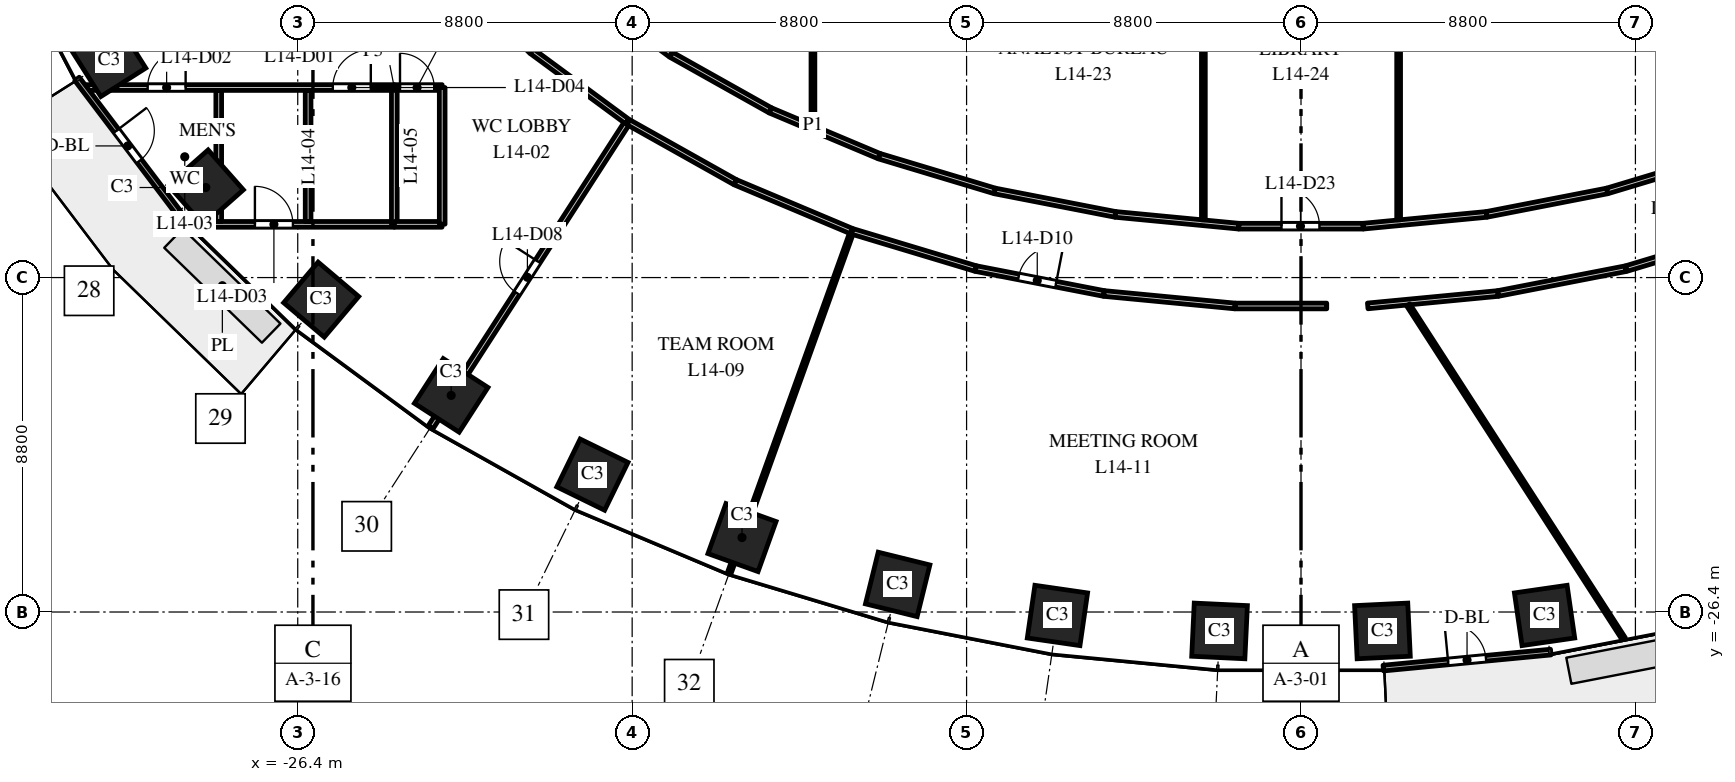
"""IFC4 building model, lengths in metres.
Left out: names, types, materials, properties, quantities, classifications, styles, units other than length and angle.
Written with IfcOpenShell. Run it as: python <this file> out.ifc"""

import sys

from ifc_helpers import new_model, si_unit, direction, frame, frame_2d, origin, origin_2d, place, context, subcontext, project, spatial, rectangle, extrude, element, fill, save


model = new_model("IFC4")
c1 = context("Model", 3, precision=1e-05, world=origin(), true_north=direction((0.0, 1.0)))
c2 = subcontext(c1, "Body", "Model", "MODEL_VIEW")
j1 = project(units=[si_unit("LENGTHUNIT", "METRE"), si_unit("PLANEANGLEUNIT", "RADIAN")], contexts=[c1])
p1 = place(None, origin())
s1 = spatial("IfcSite", under=j1, at=p1, CompositionType="ELEMENT")
p2 = place(p1, origin())
s2 = spatial("IfcBuilding", under=s1, at=p2, CompositionType="ELEMENT")
p3 = place(p2, frame((0.0, 0.0, 66.5)))
s3 = spatial("IfcBuildingStorey", under=s2, at=p3, CompositionType="ELEMENT", Elevation=66.5)
for number, where, z_axis, x_axis in (
    (1, (-31.365, -11.871, 0.0), (0.0, 0.0, 1.0), (0.535, -0.845, 0.0)),
    (2, (-28.819, -15.23, 0.0), (0.0, 0.0, 1.0), (0.663, -0.749, 0.0)),
    (3, (-25.783, -18.18, 0.0), (0.0, 0.0, 1.0), (0.763, -0.646, 0.0)),
    (4, (-22.362, -20.7, 0.0), (0.0, 0.0, 1.0), (0.84, -0.542, 0.0)),
    (5, (-18.646, -22.785, 0.0), (0.0, 0.0, 1.0), (0.898, -0.439, 0.0)),
    (6, (-14.709, -24.441, 0.0), (0.0, 0.0, 1.0), (0.941, -0.338, 0.0)),
    (7, (-10.613, -25.674, 0.0), (0.0, 0.0, 1.0), (0.971, -0.24, 0.0)),
    (8, (-6.409, -26.491, 0.0), (0.0, 0.0, 1.0), (0.99, -0.143, 0.0)),
    (9, (-2.143, -26.898, 0.0), (0.0, 0.0, 1.0), (0.999, -0.048, 0.0)),
    (10, (2.143, -26.898, 0.0), (0.0, 0.0, 1.0), (0.999, 0.048, 0.0)),
    (11, (6.409, -26.491, 0.0), (0.0, 0.0, 1.0), (0.99, 0.143, 0.0)),
):
    element("IfcColumn", number, at=place(p3, frame(where, z_axis=z_axis, x_axis=x_axis)), inside=s3, PredefinedType="COLUMN", context=c2, shape_type="SweptSolid", body=[
        extrude(rectangle(XDim=1.4, YDim=1.4, at=origin_2d()), origin(), (0.0, 0.0, 1.0), 4.0),
    ])
p4 = place(p3, frame((-32.208, -12.374, 0.0), z_axis=(0.0, 0.0, 1.0), x_axis=(0.604045763106, -0.796949632081, 0.0)))
e12 = element("IfcWall", 12, at=p4, inside=s3, PredefinedType="STANDARD", context=c2, shape_type="SweptSolid", body=[
    extrude(rectangle(XDim=4.423, YDim=0.15, at=frame_2d((2.212, 0.0))), origin(), (0.0, 0.0, 1.0), 3.7),
])
p5 = place(p4, frame((1.712, 0.0, 0.0)))
e13 = element("IfcOpeningElement", 13, at=p5, cuts=e12, PredefinedType="OPENING", context=c2, shape_type="SweptSolid", body=[
    extrude(rectangle(XDim=1.0, YDim=2.4, at=frame_2d((0.5, 1.2))), frame((0.0, 0.085, 0.0), z_axis=(0.0, -1.0, 0.0), x_axis=(1.0, 0.0, 0.0)), (0.0, 0.0, 1.0), 0.17),
])
p6 = place(p3, frame((2.166, -27.875, 0.0), z_axis=(0.0, 0.0, 1.0), x_axis=(0.995473879823, 0.095035543824, 0.0)))
e14 = element("IfcWall", 14, at=p6, inside=s3, PredefinedType="STANDARD", context=c2, shape_type="SweptSolid", body=[
    extrude(rectangle(XDim=4.426, YDim=0.15, at=frame_2d((2.213, 0.0))), origin(), (0.0, 0.0, 1.0), 3.7),
])
p7 = place(p6, frame((1.713, 0.0, 0.0)))
e15 = element("IfcOpeningElement", 15, at=p7, cuts=e14, PredefinedType="OPENING", context=c2, shape_type="SweptSolid", body=[
    extrude(rectangle(XDim=1.0, YDim=2.4, at=frame_2d((0.5, 1.2))), frame((0.0, 0.085, 0.0), z_axis=(0.0, -1.0, 0.0), x_axis=(1.0, 0.0, 0.0)), (0.0, 0.0, 1.0), 0.17),
])
p8 = place(p3, frame((-32.063, -12.6, 0.0), z_axis=(0.0, 0.0, 1.0), x_axis=(1.0, 0.0, 0.0)))
e16 = element("IfcWall", 16, at=p8, inside=s3, PredefinedType="PARTITIONING", context=c2, shape_type="SweptSolid", body=[
    extrude(rectangle(XDim=8.204, YDim=0.15, at=frame_2d((4.102, 0.0))), origin(), (0.0, 0.0, 1.0), 2.85),
])
p9 = place(p8, frame((1.713, 0.0, 0.0)))
e17 = element("IfcOpeningElement", 17, at=p9, cuts=e16, PredefinedType="OPENING", context=c2, shape_type="SweptSolid", body=[
    extrude(rectangle(XDim=1.0, YDim=2.1, at=frame_2d((0.5, 1.05))), frame((0.0, 0.085, 0.0), z_axis=(0.0, -1.0, 0.0), x_axis=(1.0, 0.0, 0.0)), (0.0, 0.0, 1.0), 0.17),
])
p10 = place(p8, frame((6.586, 0.0, 0.0)))
e18 = element("IfcOpeningElement", 18, at=p10, cuts=e16, PredefinedType="OPENING", context=c2, shape_type="SweptSolid", body=[
    extrude(rectangle(XDim=1.0, YDim=2.1, at=frame_2d((0.5, 1.05))), frame((0.0, 0.085, 0.0), z_axis=(0.0, -1.0, 0.0), x_axis=(1.0, 0.0, 0.0)), (0.0, 0.0, 1.0), 0.17),
])
p11 = place(p3, frame((-29.252, -16.2, 0.0), z_axis=(0.0, 0.0, 1.0), x_axis=(1.0, 0.0, 0.0)))
e19 = element("IfcWall", 19, at=p11, inside=s3, PredefinedType="PARTITIONING", context=c2, shape_type="SweptSolid", body=[
    extrude(rectangle(XDim=5.393, YDim=0.15, at=frame_2d((2.697, 0.0))), origin(), (0.0, 0.0, 1.0), 2.85),
])
p12 = place(p11, frame((1.725, 0.0, 0.0)))
e20 = element("IfcOpeningElement", 20, at=p12, cuts=e19, PredefinedType="OPENING", context=c2, shape_type="SweptSolid", body=[
    extrude(rectangle(XDim=1.0, YDim=2.1, at=frame_2d((0.5, 1.05))), frame((0.0, 0.085, 0.0), z_axis=(0.0, -1.0, 0.0), x_axis=(1.0, 0.0, 0.0)), (0.0, 0.0, 1.0), 0.17),
])
p13 = place(p3, frame((-28.479, -16.125, 0.0), z_axis=(0.0, 0.0, 1.0), x_axis=(0.0, 1.0, 0.0)))
e21 = element("IfcWall", 21, at=p13, inside=s3, PredefinedType="PARTITIONING", context=c2, shape_type="SweptSolid", body=[
    extrude(rectangle(XDim=3.45, YDim=0.15, at=frame_2d((1.725, 0.0))), origin(), (0.0, 0.0, 1.0), 2.85),
])
p14 = place(p3, frame((-26.127, -16.125, 0.0), z_axis=(0.0, 0.0, 1.0), x_axis=(0.0, 1.0, 0.0)))
e22 = element("IfcWall", 22, at=p14, inside=s3, PredefinedType="PARTITIONING", context=c2, shape_type="SweptSolid", body=[
    extrude(rectangle(XDim=3.45, YDim=0.15, at=frame_2d((1.725, 0.0))), origin(), (0.0, 0.0, 1.0), 3.7),
])
p15 = place(p3, frame((-23.859, -16.2, 0.0), z_axis=(0.0, 0.0, 1.0), x_axis=(0.0, 1.0, 0.0)))
e23 = element("IfcWall", 23, at=p15, inside=s3, PredefinedType="PARTITIONING", context=c2, shape_type="SweptSolid", body=[
    extrude(rectangle(XDim=3.6, YDim=0.15, at=frame_2d((1.8, 0.0))), origin(), (0.0, 0.0, 1.0), 3.7),
])
p16 = place(p3, frame((-23.859, -16.2, 0.0), z_axis=(0.0, 0.0, 1.0), x_axis=(1.0, 0.0, 0.0)))
e24 = element("IfcWall", 24, at=p16, inside=s3, PredefinedType="PARTITIONING", context=c2, shape_type="SweptSolid", body=[
    extrude(rectangle(XDim=1.256, YDim=0.15, at=frame_2d((0.628, 0.0))), origin(), (0.0, 0.0, 1.0), 2.75),
])
p17 = place(p3, frame((-23.859, -12.6, 0.0), z_axis=(0.0, 0.0, 1.0), x_axis=(1.0, 0.0, 0.0)))
e25 = element("IfcWall", 25, at=p17, inside=s3, PredefinedType="PARTITIONING", context=c2, shape_type="SweptSolid", body=[
    extrude(rectangle(XDim=1.26, YDim=0.15, at=frame_2d((0.63, 0.0))), origin(), (0.0, 0.0, 1.0), 3.7),
])
p18 = place(p17, frame((0.15, 0.0, 0.0)))
e26 = element("IfcOpeningElement", 26, at=p18, cuts=e25, PredefinedType="OPENING", context=c2, shape_type="SweptSolid", body=[
    extrude(rectangle(XDim=0.9, YDim=2.1, at=frame_2d((0.45, 1.05))), frame((0.0, 0.085, 0.0), z_axis=(0.0, -1.0, 0.0), x_axis=(1.0, 0.0, 0.0)), (0.0, 0.0, 1.0), 0.17),
])
p19 = place(p3, frame((-22.905, -21.542, 0.0), z_axis=(0.0, 0.0, 1.0), x_axis=(0.542244314938, 0.840220865557, 0.0)))
e27 = element("IfcWall", 27, at=p19, inside=s3, PredefinedType="PARTITIONING", context=c2, shape_type="SweptSolid", body=[
    extrude(rectangle(XDim=9.564, YDim=0.15, at=frame_2d((4.782, 0.0))), origin(), (0.0, 0.0, 1.0), 2.85),
])
p20 = place(p19, frame((4.2, 0.0, 0.0)))
e28 = element("IfcOpeningElement", 28, at=p20, cuts=e27, PredefinedType="OPENING", context=c2, shape_type="SweptSolid", body=[
    extrude(rectangle(XDim=1.0, YDim=2.1, at=frame_2d((0.5, 1.05))), frame((0.0, 0.085, 0.0), z_axis=(0.0, -1.0, 0.0), x_axis=(1.0, 0.0, 0.0)), (0.0, 0.0, 1.0), 0.17),
])
p21 = place(p3, frame((-22.599, -16.196, 0.0), z_axis=(0.0, 0.0, 1.0), x_axis=(0.0, 1.0, 0.0)))
e29 = element("IfcWall", 29, at=p21, inside=s3, PredefinedType="PARTITIONING", context=c2, shape_type="SweptSolid", body=[
    extrude(rectangle(XDim=3.596, YDim=0.15, at=frame_2d((1.798, 0.0))), origin(), (0.0, 0.0, 1.0), 2.75),
])
p22 = place(p3, frame((-21.135, -10.775, 0.0), z_axis=(0.0, 0.0, 1.0), x_axis=(0.717043956417, -0.697027951065, 0.0)))
e30 = element("IfcWall", 30, at=p22, inside=s3, PredefinedType="PARTITIONING", context=c2, shape_type="SweptSolid", body=[
    extrude(rectangle(XDim=1.244, YDim=0.15, at=frame_2d((0.622, 0.0))), origin(), (0.0, 0.0, 1.0), 3.7),
])
p23 = place(p3, frame((-20.243, -11.642, 0.0), z_axis=(0.0, 0.0, 1.0), x_axis=(0.805148342369, -0.593073475027, 0.0)))
e31 = element("IfcWall", 31, at=p23, inside=s3, PredefinedType="PARTITIONING", context=c2, shape_type="SweptSolid", body=[
    extrude(rectangle(XDim=3.117, YDim=0.15, at=frame_2d((1.559, 0.0))), origin(), (0.0, 0.0, 1.0), 2.75),
])
p24 = place(p3, frame((-18.083, -10.625, 0.0), z_axis=(0.0, 0.0, 1.0), x_axis=(0.805150898842, -0.593070004379, 0.0)))
e32 = element("IfcWall", 32, at=p24, inside=s3, PredefinedType="PARTITIONING", context=c2, shape_type="SweptSolid", body=[
    extrude(rectangle(XDim=1.872, YDim=0.15, at=frame_2d((0.936, 0.0))), origin(), (0.0, 0.0, 1.0), 2.75),
])
p25 = place(p3, frame((-17.699, -13.513, 0.0), z_axis=(0.0, 0.0, 1.0), x_axis=(0.872072163686, -0.489377299559, 0.0)))
e33 = element("IfcWall", 33, at=p25, inside=s3, PredefinedType="PARTITIONING", context=c2, shape_type="SweptSolid", body=[
    extrude(rectangle(XDim=3.227, YDim=0.15, at=frame_2d((1.613, 0.0))), origin(), (0.0, 0.0, 1.0), 3.7),
])
p26 = place(p3, frame((-16.576, -11.735, 0.0), z_axis=(0.0, 0.0, 1.0), x_axis=(0.872164226045, -0.489213207924, 0.0)))
e34 = element("IfcWall", 34, at=p26, inside=s3, PredefinedType="PARTITIONING", context=c2, shape_type="SweptSolid", body=[
    extrude(rectangle(XDim=2.998, YDim=0.15, at=frame_2d((1.499, 0.0))), origin(), (0.0, 0.0, 1.0), 2.75),
])
p27 = place(p3, frame((-15.048, -25.383, 0.0), z_axis=(0.0, 0.0, 1.0), x_axis=(0.338338680362, 0.941024408488, 0.0)))
e35 = element("IfcWall", 35, at=p27, inside=s3, PredefinedType="PARTITIONING", context=c2, shape_type="SweptSolid", body=[
    extrude(rectangle(XDim=9.559, YDim=0.1, at=frame_2d((4.779, 0.0))), origin(), (0.0, 0.0, 1.0), 2.85),
])
p28 = place(p3, frame((-14.885, -15.092, 0.0), z_axis=(0.0, 0.0, 1.0), x_axis=(0.921844706698, -0.387559462189, 0.0)))
e36 = element("IfcWall", 36, at=p28, inside=s3, PredefinedType="PARTITIONING", context=c2, shape_type="SweptSolid", body=[
    extrude(rectangle(XDim=3.313, YDim=0.15, at=frame_2d((1.656, 0.0))), origin(), (0.0, 0.0, 1.0), 2.85),
])
p29 = place(p3, frame((-13.961, -13.202, 0.0), z_axis=(0.0, 0.0, 1.0), x_axis=(0.921753827375, -0.387775555857, 0.0)))
e37 = element("IfcWall", 37, at=p29, inside=s3, PredefinedType="PARTITIONING", context=c2, shape_type="SweptSolid", body=[
    extrude(rectangle(XDim=3.103, YDim=0.15, at=frame_2d((1.551, 0.0))), origin(), (0.0, 0.0, 1.0), 2.85),
])
p30 = place(p3, frame((-12.843, -13.587, 0.0), z_axis=(0.0, 0.0, 1.0), x_axis=(0.0, 1.0, 0.0)))
e38 = element("IfcWall", 38, at=p30, inside=s3, PredefinedType="PARTITIONING", context=c2, shape_type="SweptSolid", body=[
    extrude(rectangle(XDim=27.174, YDim=0.1, at=frame_2d((13.587, 0.0))), origin(), (0.0, 0.0, 1.0), 2.75),
])
p31 = place(p3, frame((-11.812, -16.384, 0.0), z_axis=(0.0, 0.0, 1.0), x_axis=(0.95754884035, -0.28827108482, 0.0)))
e39 = element("IfcWall", 39, at=p31, inside=s3, PredefinedType="PARTITIONING", context=c2, shape_type="SweptSolid", body=[
    extrude(rectangle(XDim=3.396, YDim=0.15, at=frame_2d((1.698, 0.0))), origin(), (0.0, 0.0, 1.0), 3.7),
])
p32 = place(p3, frame((-11.101, -14.405, 0.0), z_axis=(0.0, 0.0, 1.0), x_axis=(0.957612601062, -0.28805920622, 0.0)))
e40 = element("IfcWall", 40, at=p32, inside=s3, PredefinedType="PARTITIONING", context=c2, shape_type="SweptSolid", body=[
    extrude(rectangle(XDim=3.18, YDim=0.15, at=frame_2d((1.59, 0.0))), origin(), (0.0, 0.0, 1.0), 3.7),
])
p33 = place(p3, frame((-8.56, -17.363, 0.0), z_axis=(0.0, 0.0, 1.0), x_axis=(0.981639027618, -0.1907480523, 0.0)))
e41 = element("IfcWall", 41, at=p33, inside=s3, PredefinedType="PARTITIONING", context=c2, shape_type="SweptSolid", body=[
    extrude(rectangle(XDim=3.439, YDim=0.15, at=frame_2d((1.72, 0.0))), origin(), (0.0, 0.0, 1.0), 2.85),
])
p34 = place(p33, frame((1.15, 0.0, 0.0)))
e42 = element("IfcOpeningElement", 42, at=p34, cuts=e41, PredefinedType="OPENING", context=c2, shape_type="SweptSolid", body=[
    extrude(rectangle(XDim=1.0, YDim=2.1, at=frame_2d((0.5, 1.05))), frame((0.0, 0.085, 0.0), z_axis=(0.0, -1.0, 0.0), x_axis=(1.0, 0.0, 0.0)), (0.0, 0.0, 1.0), 0.17),
])
p35 = place(p3, frame((-8.056, -15.321, 0.0), z_axis=(0.0, 0.0, 1.0), x_axis=(0.981604377859, -0.190926282547, 0.0)))
e43 = element("IfcWall", 43, at=p35, inside=s3, PredefinedType="PARTITIONING", context=c2, shape_type="SweptSolid", body=[
    extrude(rectangle(XDim=3.231, YDim=0.15, at=frame_2d((1.616, 0.0))), origin(), (0.0, 0.0, 1.0), 2.85),
])
p36 = place(p3, frame((-5.184, -18.019, 0.0), z_axis=(0.0, 0.0, 1.0), x_axis=(0.995482474707, -0.09494547146, 0.0)))
e44 = element("IfcWall", 44, at=p36, inside=s3, PredefinedType="PARTITIONING", context=c2, shape_type="SweptSolid", body=[
    extrude(rectangle(XDim=3.464, YDim=0.15, at=frame_2d((1.732, 0.0))), origin(), (0.0, 0.0, 1.0), 3.7),
])
p37 = place(p3, frame((-4.884, -15.938, 0.0), z_axis=(0.0, 0.0, 1.0), x_axis=(0.99547459835, -0.095028017131, 0.0)))
e45 = element("IfcWall", 45, at=p37, inside=s3, PredefinedType="PARTITIONING", context=c2, shape_type="SweptSolid", body=[
    extrude(rectangle(XDim=3.263, YDim=0.15, at=frame_2d((1.631, 0.0))), origin(), (0.0, 0.0, 1.0), 3.7),
])
p38 = place(p3, frame((-2.569, -16.08, 0.0), z_axis=(0.0, 0.0, 1.0), x_axis=(0.0, 1.0, 0.0)))
e46 = element("IfcWall", 46, at=p38, inside=s3, PredefinedType="PARTITIONING", context=c2, shape_type="SweptSolid", body=[
    extrude(rectangle(XDim=8.919, YDim=0.1, at=frame_2d((4.459, 0.0))), origin(), (0.0, 0.0, 1.0), 2.85),
])
p39 = place(p3, frame((-1.736, -18.348, 0.0), z_axis=(0.0, 0.0, 1.0), x_axis=(1.0, 0.0, 0.0)))
e47 = element("IfcWall", 47, at=p39, inside=s3, PredefinedType="PARTITIONING", context=c2, shape_type="SweptSolid", body=[
    extrude(rectangle(XDim=2.413, YDim=0.15, at=frame_2d((1.207, 0.0))), origin(), (0.0, 0.0, 1.0), 2.85),
])
p40 = place(p3, frame((-1.636, -16.248, 0.0), z_axis=(0.0, 0.0, 1.0), x_axis=(1.0, 0.0, 0.0)))
e48 = element("IfcWall", 48, at=p40, inside=s3, PredefinedType="PARTITIONING", context=c2, shape_type="SweptSolid", body=[
    extrude(rectangle(XDim=3.272, YDim=0.15, at=frame_2d((1.636, 0.0))), origin(), (0.0, 0.0, 1.0), 2.85),
])
p41 = place(p40, frame((1.122, 0.0, 0.0)))
e49 = element("IfcOpeningElement", 49, at=p41, cuts=e48, PredefinedType="OPENING", context=c2, shape_type="SweptSolid", body=[
    extrude(rectangle(XDim=1.0, YDim=2.1, at=frame_2d((0.5, 1.05))), frame((0.0, 0.085, 0.0), z_axis=(0.0, -1.0, 0.0), x_axis=(1.0, 0.0, 0.0)), (0.0, 0.0, 1.0), 0.17),
])
p42 = place(p3, frame((1.636, -16.248, 0.0), z_axis=(0.0, 0.0, 1.0), x_axis=(0.99547459835, 0.095028017131, 0.0)))
e50 = element("IfcWall", 50, at=p42, inside=s3, PredefinedType="PARTITIONING", context=c2, shape_type="SweptSolid", body=[
    extrude(rectangle(XDim=3.263, YDim=0.15, at=frame_2d((1.631, 0.0))), origin(), (0.0, 0.0, 1.0), 2.85),
])
p43 = place(p3, frame((1.756, -18.346, 0.0), z_axis=(0.0, 0.0, 1.0), x_axis=(0.99548367506, 0.094932885187, 0.0)))
e51 = element("IfcWall", 51, at=p43, inside=s3, PredefinedType="PARTITIONING", context=c2, shape_type="SweptSolid", body=[
    extrude(rectangle(XDim=3.444, YDim=0.15, at=frame_2d((1.722, 0.0))), origin(), (0.0, 0.0, 1.0), 2.85),
])
p44 = place(p3, frame((2.569, -16.08, 0.0), z_axis=(0.0, 0.0, 1.0), x_axis=(0.0, 1.0, 0.0)))
e52 = element("IfcWall", 52, at=p44, inside=s3, PredefinedType="PARTITIONING", context=c2, shape_type="SweptSolid", body=[
    extrude(rectangle(XDim=8.919, YDim=0.1, at=frame_2d((4.459, 0.0))), origin(), (0.0, 0.0, 1.0), 2.85),
])
p45 = place(p3, frame((2.822, -18.32, 0.0), z_axis=(0.0, 0.0, 1.0), x_axis=(0.54232046371, -0.840171717354, 0.0)))
e53 = element("IfcWall", 53, at=p45, inside=s3, PredefinedType="PARTITIONING", context=c2, shape_type="SweptSolid", body=[
    extrude(rectangle(XDim=10.455, YDim=0.1, at=frame_2d((5.228, 0.0))), origin(), (0.0, 0.0, 1.0), 2.85),
])
p46 = place(p3, frame((4.884, -15.938, 0.0), z_axis=(0.0, 0.0, 1.0), x_axis=(0.981604377859, 0.190926282547, 0.0)))
e54 = element("IfcWall", 54, at=p46, inside=s3, PredefinedType="PARTITIONING", context=c2, shape_type="SweptSolid", body=[
    extrude(rectangle(XDim=3.231, YDim=0.15, at=frame_2d((1.616, 0.0))), origin(), (0.0, 0.0, 1.0), 3.7),
])
p47 = place(p3, frame((5.184, -18.019, 0.0), z_axis=(0.0, 0.0, 1.0), x_axis=(0.981650299947, 0.190690032812, 0.0)))
e55 = element("IfcWall", 55, at=p47, inside=s3, PredefinedType="PARTITIONING", context=c2, shape_type="SweptSolid", body=[
    extrude(rectangle(XDim=3.42, YDim=0.15, at=frame_2d((1.71, 0.0))), origin(), (0.0, 0.0, 1.0), 3.7),
])
p48 = place(p3, frame((8.056, -15.321, 0.0), z_axis=(0.0, 0.0, 1.0), x_axis=(0.957612601062, 0.28805920622, 0.0)))
e56 = element("IfcWall", 56, at=p48, inside=s3, PredefinedType="PARTITIONING", context=c2, shape_type="SweptSolid", body=[
    extrude(rectangle(XDim=3.18, YDim=0.15, at=frame_2d((1.59, 0.0))), origin(), (0.0, 0.0, 1.0), 2.85),
])
p49 = place(p3, frame((8.56, -17.363, 0.0), z_axis=(0.0, 0.0, 1.0), x_axis=(0.95754884035, 0.28827108482, 0.0)))
e57 = element("IfcWall", 57, at=p49, inside=s3, PredefinedType="PARTITIONING", context=c2, shape_type="SweptSolid", body=[
    extrude(rectangle(XDim=3.396, YDim=0.15, at=frame_2d((1.698, 0.0))), origin(), (0.0, 0.0, 1.0), 2.85),
])
p50 = place(p49, frame((1.15, 0.0, 0.0)))
e58 = element("IfcOpeningElement", 58, at=p50, cuts=e57, PredefinedType="OPENING", context=c2, shape_type="SweptSolid", body=[
    extrude(rectangle(XDim=1.0, YDim=2.1, at=frame_2d((0.5, 1.05))), frame((0.0, 0.085, 0.0), z_axis=(0.0, -1.0, 0.0), x_axis=(1.0, 0.0, 0.0)), (0.0, 0.0, 1.0), 0.17),
])
p51 = place(p5, origin())
e59 = element("IfcDoor", 59, at=p51, inside=s3, OperationType="SINGLE_SWING_LEFT", PredefinedType="DOOR", context=c2, shape_type="SweptSolid", body=[
    extrude(rectangle(XDim=1.0, YDim=2.4, at=frame_2d((0.5, 1.2))), frame((0.0, 0.025, 0.0), z_axis=(0.0, -1.0, 0.0), x_axis=(1.0, 0.0, 0.0)), (0.0, 0.0, 1.0), 0.05),
])
fill(e13, e59)
p52 = place(p7, origin())
e60 = element("IfcDoor", 60, at=p52, inside=s3, OperationType="SINGLE_SWING_LEFT", PredefinedType="DOOR", context=c2, shape_type="SweptSolid", body=[
    extrude(rectangle(XDim=1.0, YDim=2.4, at=frame_2d((0.5, 1.2))), frame((0.0, 0.025, 0.0), z_axis=(0.0, -1.0, 0.0), x_axis=(1.0, 0.0, 0.0)), (0.0, 0.0, 1.0), 0.05),
])
fill(e15, e60)
p53 = place(p9, origin())
e61 = element("IfcDoor", 61, at=p53, inside=s3, OperationType="SINGLE_SWING_RIGHT", PredefinedType="DOOR", context=c2, shape_type="SweptSolid", body=[
    extrude(rectangle(XDim=1.0, YDim=2.1, at=frame_2d((0.5, 1.05))), frame((0.0, 0.025, 0.0), z_axis=(0.0, -1.0, 0.0), x_axis=(1.0, 0.0, 0.0)), (0.0, 0.0, 1.0), 0.05),
])
fill(e17, e61)
p54 = place(p12, origin())
e62 = element("IfcDoor", 62, at=p54, inside=s3, OperationType="SINGLE_SWING_LEFT", PredefinedType="DOOR", context=c2, shape_type="SweptSolid", body=[
    extrude(rectangle(XDim=1.0, YDim=2.1, at=frame_2d((0.5, 1.05))), frame((0.0, 0.025, 0.0), z_axis=(0.0, -1.0, 0.0), x_axis=(1.0, 0.0, 0.0)), (0.0, 0.0, 1.0), 0.05),
])
fill(e20, e62)
p55 = place(p10, origin())
e63 = element("IfcDoor", 63, at=p55, inside=s3, OperationType="SINGLE_SWING_RIGHT", PredefinedType="DOOR", context=c2, shape_type="SweptSolid", body=[
    extrude(rectangle(XDim=1.0, YDim=2.1, at=frame_2d((0.5, 1.05))), frame((0.0, 0.025, 0.0), z_axis=(0.0, -1.0, 0.0), x_axis=(1.0, 0.0, 0.0)), (0.0, 0.0, 1.0), 0.05),
])
fill(e18, e63)
p56 = place(p18, origin())
e64 = element("IfcDoor", 64, at=p56, inside=s3, OperationType="SINGLE_SWING_LEFT", PredefinedType="DOOR", context=c2, shape_type="SweptSolid", body=[
    extrude(rectangle(XDim=0.9, YDim=2.1, at=frame_2d((0.45, 1.05))), frame((0.0, 0.025, 0.0), z_axis=(0.0, -1.0, 0.0), x_axis=(1.0, 0.0, 0.0)), (0.0, 0.0, 1.0), 0.05),
])
fill(e26, e64)
p57 = place(p20, origin())
e65 = element("IfcDoor", 65, at=p57, inside=s3, OperationType="SINGLE_SWING_RIGHT", PredefinedType="DOOR", context=c2, shape_type="SweptSolid", body=[
    extrude(rectangle(XDim=1.0, YDim=2.1, at=frame_2d((0.5, 1.05))), frame((0.0, 0.025, 0.0), z_axis=(0.0, -1.0, 0.0), x_axis=(1.0, 0.0, 0.0)), (0.0, 0.0, 1.0), 0.05),
])
fill(e28, e65)
p58 = place(p34, origin())
e66 = element("IfcDoor", 66, at=p58, inside=s3, OperationType="SINGLE_SWING_RIGHT", PredefinedType="DOOR", context=c2, shape_type="SweptSolid", body=[
    extrude(rectangle(XDim=1.0, YDim=2.1, at=frame_2d((0.5, 1.05))), frame((0.0, 0.025, 0.0), z_axis=(0.0, -1.0, 0.0), x_axis=(1.0, 0.0, 0.0)), (0.0, 0.0, 1.0), 0.05),
])
fill(e42, e66)
p59 = place(p41, origin())
e67 = element("IfcDoor", 67, at=p59, inside=s3, OperationType="SINGLE_SWING_LEFT", PredefinedType="DOOR", context=c2, shape_type="SweptSolid", body=[
    extrude(rectangle(XDim=1.0, YDim=2.1, at=frame_2d((0.5, 1.05))), frame((0.0, 0.025, 0.0), z_axis=(0.0, -1.0, 0.0), x_axis=(1.0, 0.0, 0.0)), (0.0, 0.0, 1.0), 0.05),
])
fill(e49, e67)
save(model, sys.argv[1])
